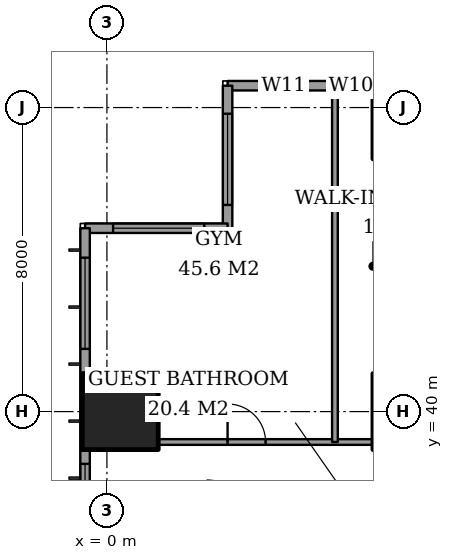
"""IFC4 building model, lengths in metres.
Left out: names, types, materials, properties, quantities, classifications, styles, units other than length and angle.
Written with IfcOpenShell. Run it as: python <this file> out.ifc"""

import sys

from ifc_helpers import new_model, si_unit, direction, frame, frame_2d, origin, origin_2d, place, context, subcontext, project, spatial, rectangle, extrude, element, fill, save


model = new_model("IFC4")
c1 = context("Model", 3, precision=1e-05, world=origin(), true_north=direction((0.0, 1.0)))
c2 = subcontext(c1, "Body", "Model", "MODEL_VIEW")
j1 = project(units=[si_unit("LENGTHUNIT", "METRE"), si_unit("PLANEANGLEUNIT", "RADIAN")], contexts=[c1])
p1 = place(None, origin())
s1 = spatial("IfcSite", under=j1, at=p1, CompositionType="ELEMENT")
p2 = place(p1, origin())
s2 = spatial("IfcBuilding", under=s1, at=p2, CompositionType="ELEMENT")
p3 = place(p2, frame((0.0, 0.0, 107.0)))
s3 = spatial("IfcBuildingStorey", under=s2, at=p3, CompositionType="ELEMENT", Elevation=107.0)
p4 = place(p3, frame((0.35, 40.0, 0.0), z_axis=(0.0, 0.0, 1.0), x_axis=(1.0, 0.0, 0.0)))
e1 = element("IfcColumn", 1, at=p4, inside=s3, PredefinedType="COLUMN", context=c2, shape_type="SweptSolid", body=[
    extrude(rectangle(XDim=2.0, YDim=2.0, at=origin_2d()), origin(), (0.0, 0.0, 1.0), 3.6),
])
p5 = place(p3, frame((24.575, 48.575, 0.0), z_axis=(0.0, 0.0, 1.0), x_axis=(-1.0, 0.0, 0.0)))
e2 = element("IfcWall", 2, at=p5, inside=s3, PredefinedType="SOLIDWALL", context=c2, shape_type="SweptSolid", body=[
    extrude(rectangle(XDim=21.4, YDim=0.25, at=frame_2d((10.7, 0.0))), origin(), (0.0, 0.0, 1.0), 3.6),
])
p6 = place(p5, frame((2.275, 0.0, 0.4)))
e3 = element("IfcOpeningElement", 3, at=p6, cuts=e2, PredefinedType="OPENING", context=c2, shape_type="SweptSolid", body=[
    extrude(rectangle(XDim=1.2, YDim=2.2, at=frame_2d((0.6, 1.1))), frame((0.0, 0.135, 0.0), z_axis=(0.0, -1.0, 0.0), x_axis=(1.0, 0.0, 0.0)), (0.0, 0.0, 1.0), 0.27),
])
p7 = place(p5, frame((4.425, 0.0, 0.4)))
e4 = element("IfcOpeningElement", 4, at=p7, cuts=e2, PredefinedType="OPENING", context=c2, shape_type="SweptSolid", body=[
    extrude(rectangle(XDim=2.4, YDim=2.2, at=frame_2d((1.2, 1.1))), frame((0.0, 0.135, 0.0), z_axis=(0.0, -1.0, 0.0), x_axis=(1.0, 0.0, 0.0)), (0.0, 0.0, 1.0), 0.27),
])
p8 = place(p5, frame((10.4, 0.0, 0.4)))
e5 = element("IfcOpeningElement", 5, at=p8, cuts=e2, PredefinedType="OPENING", context=c2, shape_type="SweptSolid", body=[
    extrude(rectangle(XDim=1.2, YDim=2.2, at=frame_2d((0.6, 1.1))), frame((0.0, 0.135, 0.0), z_axis=(0.0, -1.0, 0.0), x_axis=(1.0, 0.0, 0.0)), (0.0, 0.0, 1.0), 0.27),
])
p9 = place(p5, frame((12.475, 0.0, 0.4)))
e6 = element("IfcOpeningElement", 6, at=p9, cuts=e2, PredefinedType="OPENING", context=c2, shape_type="SweptSolid", body=[
    extrude(rectangle(XDim=2.4, YDim=2.2, at=frame_2d((1.2, 1.1))), frame((0.0, 0.135, 0.0), z_axis=(0.0, -1.0, 0.0), x_axis=(1.0, 0.0, 0.0)), (0.0, 0.0, 1.0), 0.27),
])
p10 = place(p5, frame((17.85, 0.0, 0.4)))
e7 = element("IfcOpeningElement", 7, at=p10, cuts=e2, PredefinedType="OPENING", context=c2, shape_type="SweptSolid", body=[
    extrude(rectangle(XDim=0.6, YDim=2.2, at=frame_2d((0.3, 1.1))), frame((0.0, 0.135, 0.0), z_axis=(0.0, -1.0, 0.0), x_axis=(1.0, 0.0, 0.0)), (0.0, 0.0, 1.0), 0.27),
])
p11 = place(p5, frame((19.325, 0.0, 0.4)))
e8 = element("IfcOpeningElement", 8, at=p11, cuts=e2, PredefinedType="OPENING", context=c2, shape_type="SweptSolid", body=[
    extrude(rectangle(XDim=1.2, YDim=2.2, at=frame_2d((0.6, 1.1))), frame((0.0, 0.135, 0.0), z_axis=(0.0, -1.0, 0.0), x_axis=(1.0, 0.0, 0.0)), (0.0, 0.0, 1.0), 0.27),
])
p12 = place(p3, frame((3.175, 48.575, 0.0), z_axis=(0.0, 0.0, 1.0), x_axis=(0.0, -1.0, 0.0)))
e9 = element("IfcWall", 9, at=p12, inside=s3, PredefinedType="SOLIDWALL", context=c2, shape_type="SweptSolid", body=[
    extrude(rectangle(XDim=3.75, YDim=0.25, at=frame_2d((1.875, 0.0))), origin(), (0.0, 0.0, 1.0), 3.6),
])
p13 = place(p12, frame((0.738, 0.0, 0.4)))
e10 = element("IfcOpeningElement", 10, at=p13, cuts=e9, PredefinedType="OPENING", context=c2, shape_type="SweptSolid", body=[
    extrude(rectangle(XDim=2.4, YDim=2.2, at=frame_2d((1.2, 1.1))), frame((0.0, 0.135, 0.0), z_axis=(0.0, -1.0, 0.0), x_axis=(1.0, 0.0, 0.0)), (0.0, 0.0, 1.0), 0.27),
])
p14 = place(p3, frame((3.175, 44.825, 0.0), z_axis=(0.0, 0.0, 1.0), x_axis=(-1.0, 0.0, 0.0)))
e11 = element("IfcWall", 11, at=p14, inside=s3, PredefinedType="SOLIDWALL", context=c2, shape_type="SweptSolid", body=[
    extrude(rectangle(XDim=3.75, YDim=0.25, at=frame_2d((1.875, 0.0))), origin(), (0.0, 0.0, 1.0), 3.6),
])
p15 = place(p14, frame((0.613, 0.0, 0.4)))
e12 = element("IfcOpeningElement", 12, at=p15, cuts=e11, PredefinedType="OPENING", context=c2, shape_type="SweptSolid", body=[
    extrude(rectangle(XDim=2.4, YDim=2.2, at=frame_2d((1.2, 1.1))), frame((0.0, 0.135, 0.0), z_axis=(0.0, -1.0, 0.0), x_axis=(1.0, 0.0, 0.0)), (0.0, 0.0, 1.0), 0.27),
])
p16 = place(p3, frame((-0.575, 44.825, 0.0), z_axis=(0.0, 0.0, 1.0), x_axis=(0.0, -1.0, 0.0)))
e13 = element("IfcWall", 13, at=p16, inside=s3, PredefinedType="SOLIDWALL", context=c2, shape_type="SweptSolid", body=[
    extrude(rectangle(XDim=41.65, YDim=0.25, at=frame_2d((20.825, 0.0))), origin(), (0.0, 0.0, 1.0), 3.6),
])
p17 = place(p16, frame((0.775, 0.0, 0.4)))
e14 = element("IfcOpeningElement", 14, at=p17, cuts=e13, PredefinedType="OPENING", context=c2, shape_type="SweptSolid", body=[
    extrude(rectangle(XDim=2.4, YDim=2.2, at=frame_2d((1.2, 1.1))), frame((0.0, 0.135, 0.0), z_axis=(0.0, -1.0, 0.0), x_axis=(1.0, 0.0, 0.0)), (0.0, 0.0, 1.0), 0.27),
])
p18 = place(p16, frame((6.2, 0.0, 0.4)))
e15 = element("IfcOpeningElement", 15, at=p18, cuts=e13, PredefinedType="OPENING", context=c2, shape_type="SweptSolid", body=[
    extrude(rectangle(XDim=1.2, YDim=2.2, at=frame_2d((0.6, 1.1))), frame((0.0, 0.135, 0.0), z_axis=(0.0, -1.0, 0.0), x_axis=(1.0, 0.0, 0.0)), (0.0, 0.0, 1.0), 0.27),
])
p19 = place(p16, frame((8.525, 0.0, 0.4)))
e16 = element("IfcOpeningElement", 16, at=p19, cuts=e13, PredefinedType="OPENING", context=c2, shape_type="SweptSolid", body=[
    extrude(rectangle(XDim=2.4, YDim=2.2, at=frame_2d((1.2, 1.1))), frame((0.0, 0.135, 0.0), z_axis=(0.0, -1.0, 0.0), x_axis=(1.0, 0.0, 0.0)), (0.0, 0.0, 1.0), 0.27),
])
p20 = place(p16, frame((15.625, 0.0, 0.4)))
e17 = element("IfcOpeningElement", 17, at=p20, cuts=e13, PredefinedType="OPENING", context=c2, shape_type="SweptSolid", body=[
    extrude(rectangle(XDim=2.4, YDim=2.2, at=frame_2d((1.2, 1.1))), frame((0.0, 0.135, 0.0), z_axis=(0.0, -1.0, 0.0), x_axis=(1.0, 0.0, 0.0)), (0.0, 0.0, 1.0), 0.27),
])
p21 = place(p16, frame((23.625, 0.0, 0.4)))
e18 = element("IfcOpeningElement", 18, at=p21, cuts=e13, PredefinedType="OPENING", context=c2, shape_type="SweptSolid", body=[
    extrude(rectangle(XDim=2.4, YDim=2.2, at=frame_2d((1.2, 1.1))), frame((0.0, 0.135, 0.0), z_axis=(0.0, -1.0, 0.0), x_axis=(1.0, 0.0, 0.0)), (0.0, 0.0, 1.0), 0.27),
])
p22 = place(p16, frame((30.825, 0.0, 0.4)))
e19 = element("IfcOpeningElement", 19, at=p22, cuts=e13, PredefinedType="OPENING", context=c2, shape_type="SweptSolid", body=[
    extrude(rectangle(XDim=2.4, YDim=2.2, at=frame_2d((1.2, 1.1))), frame((0.0, 0.135, 0.0), z_axis=(0.0, -1.0, 0.0), x_axis=(1.0, 0.0, 0.0)), (0.0, 0.0, 1.0), 0.27),
])
p23 = place(p16, frame((34.5, 0.0, 0.4)))
e20 = element("IfcOpeningElement", 20, at=p23, cuts=e13, PredefinedType="OPENING", context=c2, shape_type="SweptSolid", body=[
    extrude(rectangle(XDim=1.2, YDim=2.2, at=frame_2d((0.6, 1.1))), frame((0.0, 0.135, 0.0), z_axis=(0.0, -1.0, 0.0), x_axis=(1.0, 0.0, 0.0)), (0.0, 0.0, 1.0), 0.27),
])
p24 = place(p16, frame((38.475, 0.0, 0.4)))
e21 = element("IfcOpeningElement", 21, at=p24, cuts=e13, PredefinedType="OPENING", context=c2, shape_type="SweptSolid", body=[
    extrude(rectangle(XDim=2.4, YDim=2.2, at=frame_2d((1.2, 1.1))), frame((0.0, 0.135, 0.0), z_axis=(0.0, -1.0, 0.0), x_axis=(1.0, 0.0, 0.0)), (0.0, 0.0, 1.0), 0.27),
])
p25 = place(p3, frame((1.35, 39.2, 0.0), z_axis=(0.0, 0.0, 1.0), x_axis=(1.0, 0.0, 0.0)))
e22 = element("IfcWall", 22, at=p25, inside=s3, PredefinedType="PARTITIONING", context=c2, shape_type="SweptSolid", body=[
    extrude(rectangle(XDim=5.65, YDim=0.15, at=frame_2d((2.825, 0.0))), origin(), (0.0, 0.0, 1.0), 3.35),
])
p26 = place(p25, frame((1.825, 0.0, 0.0)))
e23 = element("IfcOpeningElement", 23, at=p26, cuts=e22, PredefinedType="OPENING", context=c2, shape_type="SweptSolid", body=[
    extrude(rectangle(XDim=1.0, YDim=2.1, at=frame_2d((0.5, 1.05))), frame((0.0, 0.085, 0.0), z_axis=(0.0, -1.0, 0.0), x_axis=(1.0, 0.0, 0.0)), (0.0, 0.0, 1.0), 0.17),
])
p27 = place(p3, frame((6.0, 39.2, 0.0), z_axis=(0.0, 0.0, 1.0), x_axis=(0.0, 1.0, 0.0)))
e24 = element("IfcWall", 24, at=p27, inside=s3, PredefinedType="PARTITIONING", context=c2, shape_type="SweptSolid", body=[
    extrude(rectangle(XDim=9.25, YDim=0.15, at=frame_2d((4.625, 0.0))), origin(), (0.0, 0.0, 1.0), 3.35),
])
p28 = place(p10, origin())
e25 = element("IfcWindow", 25, at=p28, inside=s3, PartitioningType="SINGLE_PANEL", PredefinedType="WINDOW", context=c2, shape_type="SweptSolid", body=[
    extrude(rectangle(XDim=0.6, YDim=2.2, at=frame_2d((0.3, 1.1))), frame((0.0, 0.03, 0.0), z_axis=(0.0, -1.0, 0.0), x_axis=(1.0, 0.0, 0.0)), (0.0, 0.0, 1.0), 0.06),
])
fill(e7, e25)
p29 = place(p11, origin())
e26 = element("IfcWindow", 26, at=p29, inside=s3, PartitioningType="SINGLE_PANEL", PredefinedType="WINDOW", context=c2, shape_type="SweptSolid", body=[
    extrude(rectangle(XDim=1.2, YDim=2.2, at=frame_2d((0.6, 1.1))), frame((0.0, 0.03, 0.0), z_axis=(0.0, -1.0, 0.0), x_axis=(1.0, 0.0, 0.0)), (0.0, 0.0, 1.0), 0.06),
])
fill(e8, e26)
p30 = place(p13, origin())
e27 = element("IfcWindow", 27, at=p30, inside=s3, PartitioningType="SINGLE_PANEL", PredefinedType="WINDOW", context=c2, shape_type="SweptSolid", body=[
    extrude(rectangle(XDim=2.4, YDim=2.2, at=frame_2d((1.2, 1.1))), frame((0.0, 0.03, 0.0), z_axis=(0.0, -1.0, 0.0), x_axis=(1.0, 0.0, 0.0)), (0.0, 0.0, 1.0), 0.06),
])
fill(e10, e27)
p31 = place(p15, origin())
e28 = element("IfcWindow", 28, at=p31, inside=s3, PartitioningType="SINGLE_PANEL", PredefinedType="WINDOW", context=c2, shape_type="SweptSolid", body=[
    extrude(rectangle(XDim=2.4, YDim=2.2, at=frame_2d((1.2, 1.1))), frame((0.0, 0.03, 0.0), z_axis=(0.0, -1.0, 0.0), x_axis=(1.0, 0.0, 0.0)), (0.0, 0.0, 1.0), 0.06),
])
fill(e12, e28)
p32 = place(p17, origin())
e29 = element("IfcWindow", 29, at=p32, inside=s3, PartitioningType="SINGLE_PANEL", PredefinedType="WINDOW", context=c2, shape_type="SweptSolid", body=[
    extrude(rectangle(XDim=2.4, YDim=2.2, at=frame_2d((1.2, 1.1))), frame((0.0, 0.03, 0.0), z_axis=(0.0, -1.0, 0.0), x_axis=(1.0, 0.0, 0.0)), (0.0, 0.0, 1.0), 0.06),
])
fill(e14, e29)
p33 = place(p18, origin())
e30 = element("IfcWindow", 30, at=p33, inside=s3, PartitioningType="SINGLE_PANEL", PredefinedType="WINDOW", context=c2, shape_type="SweptSolid", body=[
    extrude(rectangle(XDim=1.2, YDim=2.2, at=frame_2d((0.6, 1.1))), frame((0.0, 0.03, 0.0), z_axis=(0.0, -1.0, 0.0), x_axis=(1.0, 0.0, 0.0)), (0.0, 0.0, 1.0), 0.06),
])
fill(e15, e30)
p34 = place(p26, origin())
e31 = element("IfcDoor", 31, at=p34, inside=s3, OperationType="SINGLE_SWING_RIGHT", PredefinedType="DOOR", context=c2, shape_type="SweptSolid", body=[
    extrude(rectangle(XDim=1.0, YDim=2.1, at=frame_2d((0.5, 1.05))), frame((0.0, 0.025, 0.0), z_axis=(0.0, -1.0, 0.0), x_axis=(1.0, 0.0, 0.0)), (0.0, 0.0, 1.0), 0.05),
])
fill(e23, e31)
save(model, sys.argv[1])
